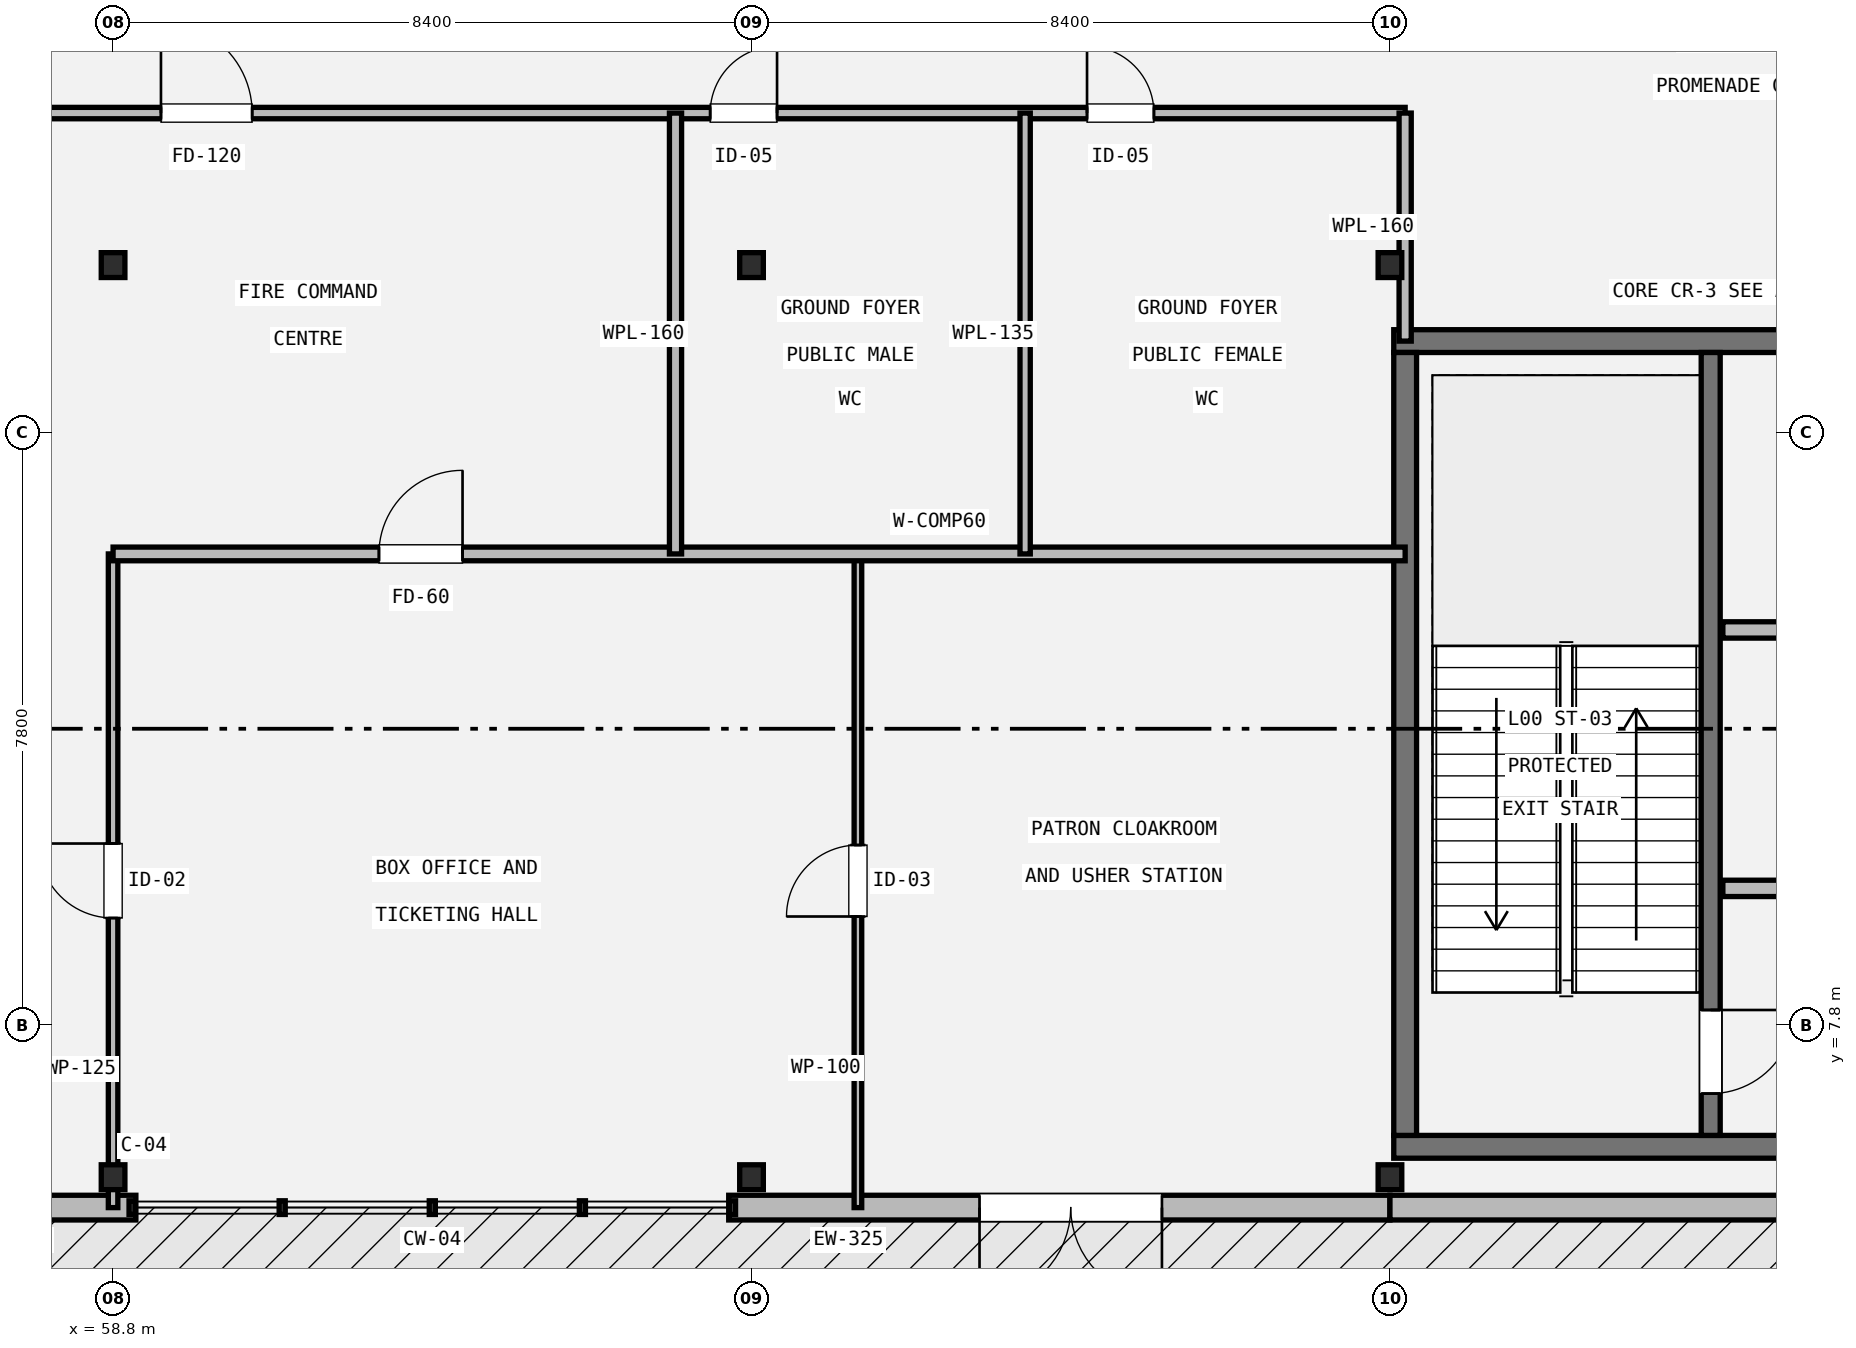
"""IFC4 building model, lengths in metres.
Left out: names, types, materials, properties, quantities, classifications, styles, units other than length and angle.
Written with IfcOpenShell. Run it as: python <this file> out.ifc"""

import sys

from ifc_helpers import new_model, si_unit, direction, frame, frame_2d, origin, origin_2d, place, context, subcontext, project, spatial, rectangle, i_section, extrude, element, fill, save


model = new_model("IFC4")
c1 = context("Model", 3, precision=1e-05, world=origin(), true_north=direction((0.0, 1.0)))
c2 = subcontext(c1, "Body", "Model", "MODEL_VIEW")
j1 = project(units=[si_unit("LENGTHUNIT", "METRE"), si_unit("PLANEANGLEUNIT", "RADIAN")], contexts=[c1])
p1 = place(None, origin())
s1 = spatial("IfcSite", under=j1, at=p1, CompositionType="ELEMENT")
p2 = place(p1, origin())
s2 = spatial("IfcBuilding", under=s1, at=p2, CompositionType="ELEMENT")
p3 = place(p2, origin())
s3 = spatial("IfcBuildingStorey", under=s2, at=p3, CompositionType="ELEMENT", Elevation=0.0)
for number, where, z_axis, x_axis in (
    (1, (58.8, 5.8, 0.0), (0.0, 0.0, 1.0), (1.0, 0.0, 0.0)),
    (2, (58.8, 17.8, 0.0), (0.0, 0.0, 1.0), (1.0, 0.0, 0.0)),
    (3, (67.2, 5.8, 0.0), (0.0, 0.0, 1.0), (1.0, 0.0, 0.0)),
    (4, (67.2, 17.8, 0.0), (0.0, 0.0, 1.0), (1.0, 0.0, 0.0)),
    (5, (75.6, 5.8, 0.0), (0.0, 0.0, 1.0), (1.0, 0.0, 0.0)),
    (6, (75.6, 17.8, 0.0), (0.0, 0.0, 1.0), (1.0, 0.0, 0.0)),
):
    element("IfcColumn", number, at=place(p3, frame(where, z_axis=z_axis, x_axis=x_axis)), inside=s3, PredefinedType="COLUMN", context=c2, shape_type="SweptSolid", body=[
        extrude(i_section(OverallWidth=0.311, OverallDepth=0.327, WebThickness=0.016, FlangeThickness=0.025, FilletRadius=0.015, at=origin_2d()), origin(), (0.0, 0.0, 1.0), 5.4),
    ])
p4 = place(p3, frame((59.1, 5.4, 0.0), z_axis=(0.0, 0.0, 1.0), x_axis=(-1.0, 0.0, 0.0)))
e7 = element("IfcWall", 7, at=p4, inside=s3, PredefinedType="STANDARD", context=c2, shape_type="SweptSolid", body=[
    extrude(rectangle(XDim=9.0, YDim=0.325, at=frame_2d((4.5, 0.0))), origin(), (0.0, 0.0, 1.0), 4.662),
])
p5 = place(p4, frame((3.3, 0.0, 0.0)))
e8 = element("IfcOpeningElement", 8, at=p5, cuts=e7, PredefinedType="OPENING", context=c2, shape_type="SweptSolid", body=[
    extrude(rectangle(XDim=2.4, YDim=2.6, at=frame_2d((1.2, 1.3))), frame((0.0, 0.172, 0.0), z_axis=(0.0, -1.0, 0.0), x_axis=(1.0, 0.0, 0.0)), (0.0, 0.0, 1.0), 0.345),
])
p6 = place(p3, frame((75.6, 5.4, 0.0), z_axis=(0.0, 0.0, 1.0), x_axis=(-1.0, 0.0, 0.0)))
e9 = element("IfcWall", 9, at=p6, inside=s3, PredefinedType="STANDARD", context=c2, shape_type="SweptSolid", body=[
    extrude(rectangle(XDim=8.7, YDim=0.325, at=frame_2d((4.35, 0.0))), origin(), (0.0, 0.0, 1.0), 4.662),
])
p7 = place(p6, frame((3.0, 0.0, 0.0)))
e10 = element("IfcOpeningElement", 10, at=p7, cuts=e9, PredefinedType="OPENING", context=c2, shape_type="SweptSolid", body=[
    extrude(rectangle(XDim=2.4, YDim=2.6, at=frame_2d((1.2, 1.3))), frame((0.0, 0.172, 0.0), z_axis=(0.0, -1.0, 0.0), x_axis=(1.0, 0.0, 0.0)), (0.0, 0.0, 1.0), 0.345),
])
p8 = place(p3, frame((84.3, 5.4, 0.0), z_axis=(0.0, 0.0, 1.0), x_axis=(-1.0, 0.0, 0.0)))
e11 = element("IfcWall", 11, at=p8, inside=s3, PredefinedType="STANDARD", context=c2, shape_type="SweptSolid", body=[
    extrude(rectangle(XDim=8.7, YDim=0.325, at=frame_2d((4.35, 0.0))), origin(), (0.0, 0.0, 1.0), 4.662),
])
for number, where, z_axis, x_axis in (
    (12, (84.15, 6.2, 0.0), (0.0, 0.0, 1.0), (-1.0, 0.0, 0.0)),
    (13, (75.65, 16.8, 0.0), (0.0, 0.0, 1.0), (1.0, 0.0, 0.0)),
):
    element("IfcWall", number, at=place(p3, frame(where, z_axis=z_axis, x_axis=x_axis)), inside=s3, PredefinedType="SHEAR", context=c2, shape_type="SweptSolid", body=[
        extrude(rectangle(XDim=8.5, YDim=0.3, at=frame_2d((4.25, 0.0))), origin(), (0.0, 0.0, 1.0), 5.18),
    ])
p9 = place(p3, frame((75.8, 6.35, 0.0), z_axis=(0.0, 0.0, 1.0), x_axis=(0.0, 1.0, 0.0)))
e14 = element("IfcWall", 14, at=p9, inside=s3, PredefinedType="SHEAR", context=c2, shape_type="SweptSolid", body=[
    extrude(rectangle(XDim=10.3, YDim=0.3, at=frame_2d((5.15, 0.0))), origin(), (0.0, 0.0, 1.0), 5.18),
])
p10 = place(p3, frame((79.82, 16.65, 0.0), z_axis=(0.0, 0.0, 1.0), x_axis=(0.0, -1.0, 0.0)))
e15 = element("IfcWall", 15, at=p10, inside=s3, PredefinedType="SHEAR", context=c2, shape_type="SweptSolid", body=[
    extrude(rectangle(XDim=10.3, YDim=0.25, at=frame_2d((5.15, 0.0))), origin(), (0.0, 0.0, 1.0), 5.18),
])
p11 = place(p10, frame((8.65, 0.0, 0.0)))
e16 = element("IfcOpeningElement", 16, at=p11, cuts=e15, PredefinedType="OPENING", context=c2, shape_type="SweptSolid", body=[
    extrude(rectangle(XDim=1.1, YDim=2.15, at=frame_2d((0.55, 1.075))), frame((0.0, 0.135, 0.0), z_axis=(0.0, -1.0, 0.0), x_axis=(1.0, 0.0, 0.0)), (0.0, 0.0, 1.0), 0.27),
])
p12 = place(p3, frame((79.98, 9.6, 0.0), z_axis=(0.0, 0.0, 1.0), x_axis=(1.0, 0.0, 0.0)))
e17 = element("IfcWall", 17, at=p12, inside=s3, PredefinedType="STANDARD", context=c2, shape_type="SweptSolid", body=[
    extrude(rectangle(XDim=3.85, YDim=0.215, at=frame_2d((1.925, 0.0))), origin(), (0.0, 0.0, 1.0), 4.555),
])
p13 = place(p12, frame((1.4, 0.0, 0.0)))
e18 = element("IfcOpeningElement", 18, at=p13, cuts=e17, PredefinedType="OPENING", context=c2, shape_type="SweptSolid", body=[
    extrude(rectangle(XDim=1.05, YDim=2.15, at=frame_2d((0.525, 1.075))), frame((0.0, 0.117, 0.0), z_axis=(0.0, -1.0, 0.0), x_axis=(1.0, 0.0, 0.0)), (0.0, 0.0, 1.0), 0.235),
])
p14 = place(p3, frame((79.98, 13.0, 0.0), z_axis=(0.0, 0.0, 1.0), x_axis=(1.0, 0.0, 0.0)))
e19 = element("IfcWall", 19, at=p14, inside=s3, PredefinedType="STANDARD", context=c2, shape_type="SweptSolid", body=[
    extrude(rectangle(XDim=3.85, YDim=0.215, at=frame_2d((1.925, 0.0))), origin(), (0.0, 0.0, 1.0), 4.555),
])
p15 = place(p14, frame((1.4, 0.0, 0.0)))
e20 = element("IfcOpeningElement", 20, at=p15, cuts=e19, PredefinedType="OPENING", context=c2, shape_type="SweptSolid", body=[
    extrude(rectangle(XDim=1.05, YDim=2.15, at=frame_2d((0.525, 1.075))), frame((0.0, 0.117, 0.0), z_axis=(0.0, -1.0, 0.0), x_axis=(1.0, 0.0, 0.0)), (0.0, 0.0, 1.0), 0.235),
])
p16 = place(p3, frame((33.6, 19.8, 0.0), z_axis=(0.0, 0.0, 1.0), x_axis=(1.0, 0.0, 0.0)))
e21 = element("IfcWall", 21, at=p16, inside=s3, PredefinedType="PARTITIONING", context=c2, shape_type="SweptSolid", body=[
    extrude(rectangle(XDim=42.2, YDim=0.15, at=frame_2d((21.1, 0.0))), origin(), (0.0, 0.0, 1.0), 4.632),
])
p17 = place(p16, frame((11.536, 0.0, 0.0)))
e22 = element("IfcOpeningElement", 22, at=p17, cuts=e21, PredefinedType="OPENING", context=c2, shape_type="SweptSolid", body=[
    extrude(rectangle(XDim=1.0, YDim=2.1, at=frame_2d((0.5, 1.05))), frame((0.0, 0.085, 0.0), z_axis=(0.0, -1.0, 0.0), x_axis=(1.0, 0.0, 0.0)), (0.0, 0.0, 1.0), 0.17),
])
p18 = place(p16, frame((25.83, 0.0, 0.0)))
e23 = element("IfcOpeningElement", 23, at=p18, cuts=e21, PredefinedType="OPENING", context=c2, shape_type="SweptSolid", body=[
    extrude(rectangle(XDim=1.2, YDim=2.15, at=frame_2d((0.6, 1.075))), frame((0.0, 0.085, 0.0), z_axis=(0.0, -1.0, 0.0), x_axis=(1.0, 0.0, 0.0)), (0.0, 0.0, 1.0), 0.17),
])
p19 = place(p16, frame((33.056, 0.0, 0.0)))
e24 = element("IfcOpeningElement", 24, at=p19, cuts=e21, PredefinedType="OPENING", context=c2, shape_type="SweptSolid", body=[
    extrude(rectangle(XDim=0.88, YDim=2.05, at=frame_2d((0.44, 1.025))), frame((0.0, 0.085, 0.0), z_axis=(0.0, -1.0, 0.0), x_axis=(1.0, 0.0, 0.0)), (0.0, 0.0, 1.0), 0.17),
])
p20 = place(p16, frame((38.014, 0.0, 0.0)))
e25 = element("IfcOpeningElement", 25, at=p20, cuts=e21, PredefinedType="OPENING", context=c2, shape_type="SweptSolid", body=[
    extrude(rectangle(XDim=0.88, YDim=2.05, at=frame_2d((0.44, 1.025))), frame((0.0, 0.085, 0.0), z_axis=(0.0, -1.0, 0.0), x_axis=(1.0, 0.0, 0.0)), (0.0, 0.0, 1.0), 0.17),
])
p21 = place(p3, frame((58.8, 5.4, 0.0), z_axis=(0.0, 0.0, 1.0), x_axis=(0.0, 1.0, 0.0)))
e26 = element("IfcWall", 26, at=p21, inside=s3, PredefinedType="PARTITIONING", context=c2, shape_type="SweptSolid", body=[
    extrude(rectangle(XDim=8.6, YDim=0.125, at=frame_2d((4.3, 0.0))), origin(), (0.0, 0.0, 1.0), 4.639),
])
p22 = place(p21, frame((3.81, 0.0, 0.0)))
e27 = element("IfcOpeningElement", 27, at=p22, cuts=e26, PredefinedType="OPENING", context=c2, shape_type="SweptSolid", body=[
    extrude(rectangle(XDim=0.98, YDim=2.1, at=frame_2d((0.49, 1.05))), frame((0.0, 0.073, 0.0), z_axis=(0.0, -1.0, 0.0), x_axis=(1.0, 0.0, 0.0)), (0.0, 0.0, 1.0), 0.145),
])
p23 = place(p3, frame((68.6, 5.4, 0.0), z_axis=(0.0, 0.0, 1.0), x_axis=(0.0, 1.0, 0.0)))
e28 = element("IfcWall", 28, at=p23, inside=s3, PredefinedType="PARTITIONING", context=c2, shape_type="SweptSolid", body=[
    extrude(rectangle(XDim=8.6, YDim=0.1, at=frame_2d((4.3, 0.0))), origin(), (0.0, 0.0, 1.0), 4.639),
])
p24 = place(p23, frame((3.83, 0.0, 0.0)))
e29 = element("IfcOpeningElement", 29, at=p24, cuts=e28, PredefinedType="OPENING", context=c2, shape_type="SweptSolid", body=[
    extrude(rectangle(XDim=0.94, YDim=2.1, at=frame_2d((0.47, 1.05))), frame((0.0, 0.06, 0.0), z_axis=(0.0, -1.0, 0.0), x_axis=(1.0, 0.0, 0.0)), (0.0, 0.0, 1.0), 0.12),
])
p25 = place(p3, frame((58.8, 14.0, 0.0), z_axis=(0.0, 0.0, 1.0), x_axis=(1.0, 0.0, 0.0)))
e30 = element("IfcWall", 30, at=p25, inside=s3, PredefinedType="STANDARD", context=c2, shape_type="SweptSolid", body=[
    extrude(rectangle(XDim=17.0, YDim=0.18, at=frame_2d((8.5, 0.0))), origin(), (0.0, 0.0, 1.0), 4.555),
])
p26 = place(p25, frame((3.498, 0.0, 0.0)))
e31 = element("IfcOpeningElement", 31, at=p26, cuts=e30, PredefinedType="OPENING", context=c2, shape_type="SweptSolid", body=[
    extrude(rectangle(XDim=1.1, YDim=2.15, at=frame_2d((0.55, 1.075))), frame((0.0, 0.1, 0.0), z_axis=(0.0, -1.0, 0.0), x_axis=(1.0, 0.0, 0.0)), (0.0, 0.0, 1.0), 0.2),
])
p27 = place(p3, frame((66.2, 14.0, 0.0), z_axis=(0.0, 0.0, 1.0), x_axis=(0.0, 1.0, 0.0)))
e32 = element("IfcWall", 32, at=p27, inside=s3, PredefinedType="PLUMBINGWALL", context=c2, shape_type="SweptSolid", body=[
    extrude(rectangle(XDim=5.8, YDim=0.16, at=frame_2d((2.9, 0.0))), origin(), (0.0, 0.0, 1.0), 4.639),
])
p28 = place(p3, frame((70.8, 14.0, 0.0), z_axis=(0.0, 0.0, 1.0), x_axis=(0.0, 1.0, 0.0)))
e33 = element("IfcWall", 33, at=p28, inside=s3, PredefinedType="PLUMBINGWALL", context=c2, shape_type="SweptSolid", body=[
    extrude(rectangle(XDim=5.8, YDim=0.135, at=frame_2d((2.9, 0.0))), origin(), (0.0, 0.0, 1.0), 4.639),
])
p29 = place(p3, frame((75.8, 16.8, 0.0), z_axis=(0.0, 0.0, 1.0), x_axis=(0.0, 1.0, 0.0)))
e34 = element("IfcWall", 34, at=p29, inside=s3, PredefinedType="PLUMBINGWALL", context=c2, shape_type="SweptSolid", body=[
    extrude(rectangle(XDim=3.0, YDim=0.16, at=frame_2d((1.5, 0.0))), origin(), (0.0, 0.0, 1.0), 4.555),
])
p30 = place(p7, origin())
e35 = element("IfcDoor", 35, at=p30, inside=s3, OperationType="DOUBLE_SWING_RIGHT", PredefinedType="DOOR", context=c2, shape_type="SweptSolid", body=[
    extrude(rectangle(XDim=2.4, YDim=2.6, at=frame_2d((1.2, 1.3))), frame((0.0, 0.025, 0.0), z_axis=(0.0, -1.0, 0.0), x_axis=(1.0, 0.0, 0.0)), (0.0, 0.0, 1.0), 0.05),
])
fill(e10, e35)
p31 = place(p11, origin())
e36 = element("IfcDoor", 36, at=p31, inside=s3, OperationType="SINGLE_SWING_LEFT", PredefinedType="DOOR", context=c2, shape_type="SweptSolid", body=[
    extrude(rectangle(XDim=1.1, YDim=2.15, at=frame_2d((0.55, 1.075))), frame((0.0, 0.025, 0.0), z_axis=(0.0, -1.0, 0.0), x_axis=(1.0, 0.0, 0.0)), (0.0, 0.0, 1.0), 0.05),
])
fill(e16, e36)
p32 = place(p18, origin())
e37 = element("IfcDoor", 37, at=p32, inside=s3, OperationType="SINGLE_SWING_LEFT", PredefinedType="DOOR", context=c2, shape_type="SweptSolid", body=[
    extrude(rectangle(XDim=1.2, YDim=2.15, at=frame_2d((0.6, 1.075))), frame((0.0, 0.025, 0.0), z_axis=(0.0, -1.0, 0.0), x_axis=(1.0, 0.0, 0.0)), (0.0, 0.0, 1.0), 0.05),
])
fill(e23, e37)
p33 = place(p19, origin())
e38 = element("IfcDoor", 38, at=p33, inside=s3, OperationType="SINGLE_SWING_RIGHT", PredefinedType="DOOR", context=c2, shape_type="SweptSolid", body=[
    extrude(rectangle(XDim=0.88, YDim=2.05, at=frame_2d((0.44, 1.025))), frame((0.0, 0.025, 0.0), z_axis=(0.0, -1.0, 0.0), x_axis=(1.0, 0.0, 0.0)), (0.0, 0.0, 1.0), 0.05),
])
fill(e24, e38)
p34 = place(p20, origin())
e39 = element("IfcDoor", 39, at=p34, inside=s3, OperationType="SINGLE_SWING_LEFT", PredefinedType="DOOR", context=c2, shape_type="SweptSolid", body=[
    extrude(rectangle(XDim=0.88, YDim=2.05, at=frame_2d((0.44, 1.025))), frame((0.0, 0.025, 0.0), z_axis=(0.0, -1.0, 0.0), x_axis=(1.0, 0.0, 0.0)), (0.0, 0.0, 1.0), 0.05),
])
fill(e25, e39)
p35 = place(p22, origin())
e40 = element("IfcDoor", 40, at=p35, inside=s3, OperationType="SINGLE_SWING_RIGHT", PredefinedType="DOOR", context=c2, shape_type="SweptSolid", body=[
    extrude(rectangle(XDim=0.98, YDim=2.1, at=frame_2d((0.49, 1.05))), frame((0.0, 0.025, 0.0), z_axis=(0.0, -1.0, 0.0), x_axis=(1.0, 0.0, 0.0)), (0.0, 0.0, 1.0), 0.05),
])
fill(e27, e40)
p36 = place(p24, origin())
e41 = element("IfcDoor", 41, at=p36, inside=s3, OperationType="SINGLE_SWING_LEFT", PredefinedType="DOOR", context=c2, shape_type="SweptSolid", body=[
    extrude(rectangle(XDim=0.94, YDim=2.1, at=frame_2d((0.47, 1.05))), frame((0.0, 0.025, 0.0), z_axis=(0.0, -1.0, 0.0), x_axis=(1.0, 0.0, 0.0)), (0.0, 0.0, 1.0), 0.05),
])
fill(e29, e41)
p37 = place(p26, origin())
e42 = element("IfcDoor", 42, at=p37, inside=s3, OperationType="SINGLE_SWING_RIGHT", PredefinedType="DOOR", context=c2, shape_type="SweptSolid", body=[
    extrude(rectangle(XDim=1.1, YDim=2.15, at=frame_2d((0.55, 1.075))), frame((0.0, 0.025, 0.0), z_axis=(0.0, -1.0, 0.0), x_axis=(1.0, 0.0, 0.0)), (0.0, 0.0, 1.0), 0.05),
])
fill(e31, e42)
save(model, sys.argv[1])
